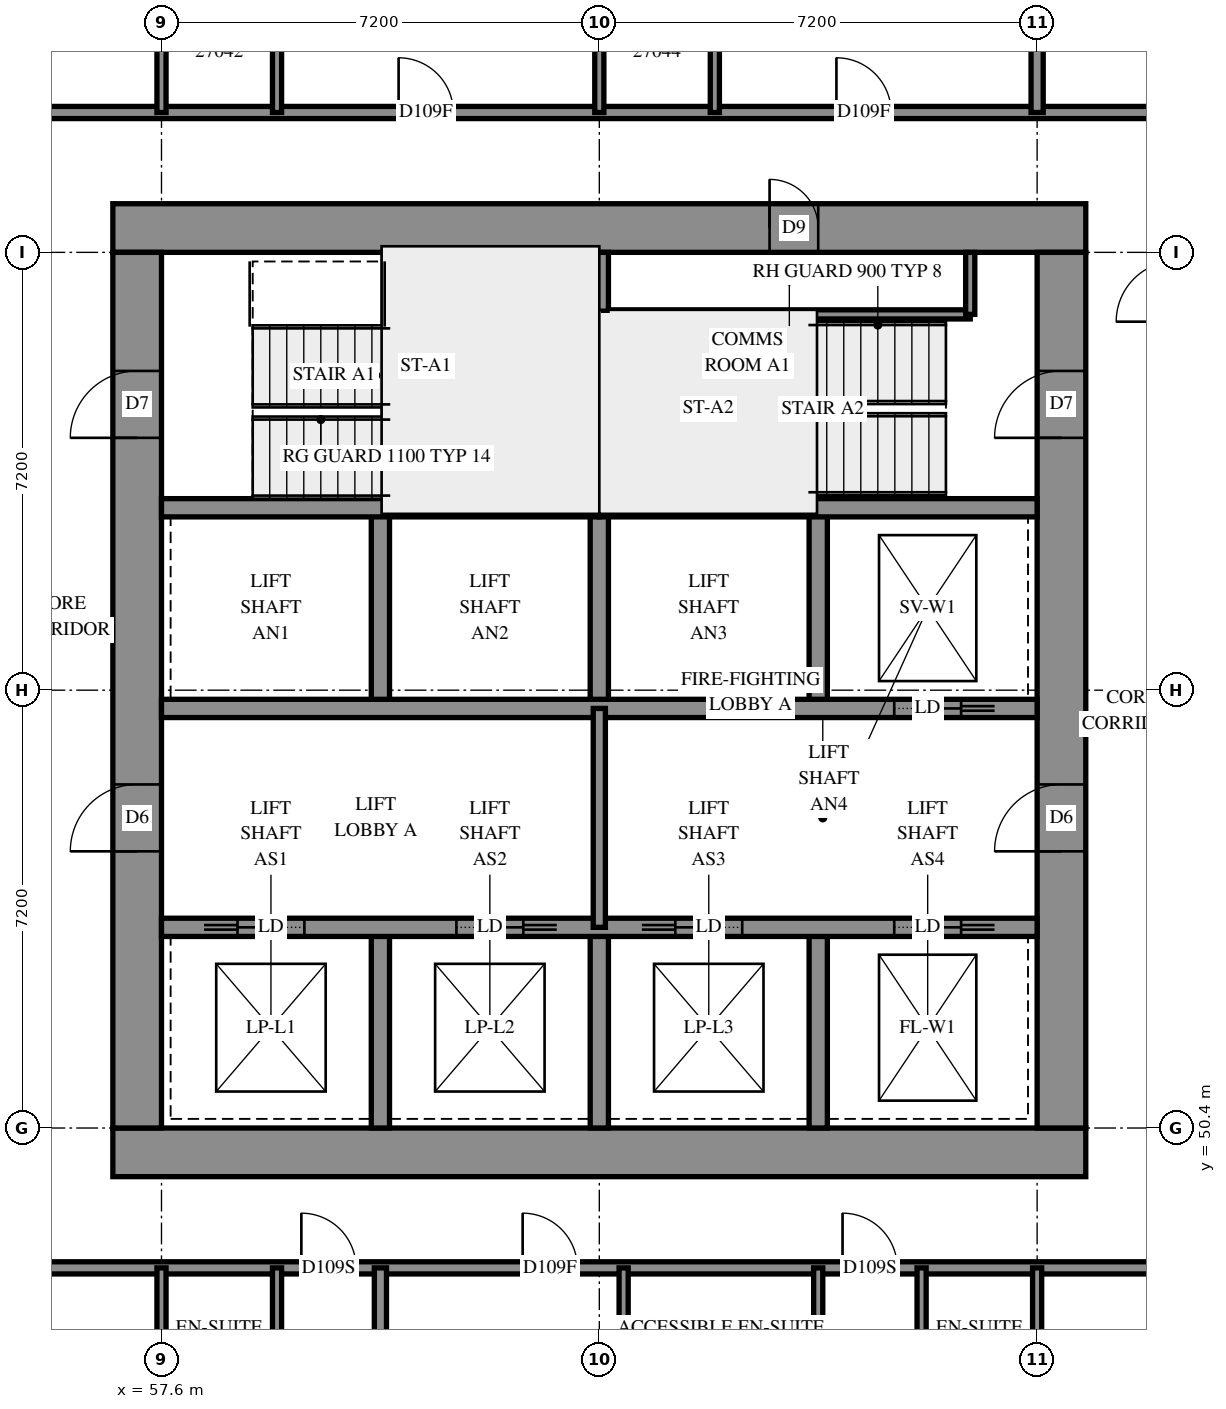
"""IFC4 building model, lengths in metres.
Left out: names, types, materials, properties, quantities, classifications, styles, units other than length and angle.
Written with IfcOpenShell. Run it as: python <this file> out.ifc"""

import sys

from ifc_helpers import new_model, si_unit, direction, frame, frame_2d, origin, place, context, subcontext, project, spatial, rectangle, extrude, element, fill, save


model = new_model("IFC4")
c1 = context("Model", 3, precision=1e-05, world=origin(), true_north=direction((0.0, 1.0)))
c2 = subcontext(c1, "Body", "Model", "MODEL_VIEW")
j1 = project(units=[si_unit("LENGTHUNIT", "METRE"), si_unit("PLANEANGLEUNIT", "RADIAN")], contexts=[c1])
p1 = place(None, origin())
s1 = spatial("IfcSite", under=j1, at=p1, CompositionType="ELEMENT")
p2 = place(p1, origin())
s2 = spatial("IfcBuilding", under=s1, at=p2, CompositionType="ELEMENT")
p3 = place(p2, frame((0.0, 0.0, 101.6)))
s3 = spatial("IfcBuildingStorey", under=s2, at=p3, CompositionType="ELEMENT", Elevation=101.6)
p4 = place(p3, frame((56.8, 50.0, -0.3), z_axis=(0.0, 0.0, 1.0), x_axis=(1.0, 0.0, 0.0)))
e1 = element("IfcWall", 1, at=p4, inside=s3, PredefinedType="SHEAR", context=c2, shape_type="SweptSolid", body=[
    extrude(rectangle(XDim=16.0, YDim=0.8, at=frame_2d((8.0, 0.0))), origin(), (0.0, 0.0, 1.0), 2.7),
])
p5 = place(p3, frame((56.8, 65.2, -0.3), z_axis=(0.0, 0.0, 1.0), x_axis=(1.0, 0.0, 0.0)))
e2 = element("IfcWall", 2, at=p5, inside=s3, PredefinedType="SHEAR", context=c2, shape_type="SweptSolid", body=[
    extrude(rectangle(XDim=16.0, YDim=0.8, at=frame_2d((8.0, 0.0))), origin(), (0.0, 0.0, 1.0), 2.7),
])
p6 = place(p5, frame((10.8, 0.0, 0.3)))
e3 = element("IfcOpeningElement", 3, at=p6, cuts=e2, PredefinedType="OPENING", context=c2, shape_type="SweptSolid", body=[
    extrude(rectangle(XDim=0.8, YDim=2.1, at=frame_2d((0.4, 1.05))), frame((0.0, 0.41, 0.0), z_axis=(0.0, -1.0, 0.0), x_axis=(1.0, 0.0, 0.0)), (0.0, 0.0, 1.0), 0.82),
])
p7 = place(p3, frame((57.2, 50.4, -0.3), z_axis=(0.0, 0.0, 1.0), x_axis=(0.0, 1.0, 0.0)))
e4 = element("IfcWall", 4, at=p7, inside=s3, PredefinedType="SHEAR", context=c2, shape_type="SweptSolid", body=[
    extrude(rectangle(XDim=14.4, YDim=0.8, at=frame_2d((7.2, 0.0))), origin(), (0.0, 0.0, 1.0), 2.7),
])
p8 = place(p7, frame((4.55, 0.0, 0.3)))
e5 = element("IfcOpeningElement", 5, at=p8, cuts=e4, PredefinedType="OPENING", context=c2, shape_type="SweptSolid", body=[
    extrude(rectangle(XDim=1.1, YDim=2.1, at=frame_2d((0.55, 1.05))), frame((0.0, 0.41, 0.0), z_axis=(0.0, -1.0, 0.0), x_axis=(1.0, 0.0, 0.0)), (0.0, 0.0, 1.0), 0.82),
])
p9 = place(p7, frame((11.35, 0.0, 0.3)))
e6 = element("IfcOpeningElement", 6, at=p9, cuts=e4, PredefinedType="OPENING", context=c2, shape_type="SweptSolid", body=[
    extrude(rectangle(XDim=1.1, YDim=2.1, at=frame_2d((0.55, 1.05))), frame((0.0, 0.41, 0.0), z_axis=(0.0, -1.0, 0.0), x_axis=(1.0, 0.0, 0.0)), (0.0, 0.0, 1.0), 0.82),
])
p10 = place(p3, frame((72.4, 50.4, -0.3), z_axis=(0.0, 0.0, 1.0), x_axis=(0.0, 1.0, 0.0)))
e7 = element("IfcWall", 7, at=p10, inside=s3, PredefinedType="SHEAR", context=c2, shape_type="SweptSolid", body=[
    extrude(rectangle(XDim=14.4, YDim=0.8, at=frame_2d((7.2, 0.0))), origin(), (0.0, 0.0, 1.0), 2.7),
])
p11 = place(p10, frame((4.55, 0.0, 0.3)))
e8 = element("IfcOpeningElement", 8, at=p11, cuts=e7, PredefinedType="OPENING", context=c2, shape_type="SweptSolid", body=[
    extrude(rectangle(XDim=1.1, YDim=2.1, at=frame_2d((0.55, 1.05))), frame((0.0, 0.41, 0.0), z_axis=(0.0, -1.0, 0.0), x_axis=(1.0, 0.0, 0.0)), (0.0, 0.0, 1.0), 0.82),
])
p12 = place(p10, frame((11.35, 0.0, 0.3)))
e9 = element("IfcOpeningElement", 9, at=p12, cuts=e7, PredefinedType="OPENING", context=c2, shape_type="SweptSolid", body=[
    extrude(rectangle(XDim=1.1, YDim=2.1, at=frame_2d((0.55, 1.05))), frame((0.0, 0.41, 0.0), z_axis=(0.0, -1.0, 0.0), x_axis=(1.0, 0.0, 0.0)), (0.0, 0.0, 1.0), 0.82),
])
for number, where, z_axis, x_axis in (
    (10, (61.2, 50.4, 0.0), (0.0, 0.0, 1.0), (0.0, 1.0, 0.0)),
    (11, (61.2, 57.3, 0.0), (0.0, 0.0, 1.0), (0.0, 1.0, 0.0)),
    (12, (64.8, 50.4, 0.0), (0.0, 0.0, 1.0), (0.0, 1.0, 0.0)),
    (13, (64.8, 57.3, 0.0), (0.0, 0.0, 1.0), (0.0, 1.0, 0.0)),
    (14, (68.4, 50.4, 0.0), (0.0, 0.0, 1.0), (0.0, 1.0, 0.0)),
    (15, (68.4, 57.3, 0.0), (0.0, 0.0, 1.0), (0.0, 1.0, 0.0)),
):
    element("IfcWall", number, at=place(p3, frame(where, z_axis=z_axis, x_axis=x_axis)), inside=s3, PredefinedType="SOLIDWALL", context=c2, shape_type="SweptSolid", body=[
        extrude(rectangle(XDim=3.3, YDim=0.3, at=frame_2d((1.65, 0.0))), origin(), (0.0, 0.0, 1.0), 3.1),
    ])
p13 = place(p3, frame((57.6, 53.7, 0.0), z_axis=(0.0, 0.0, 1.0), x_axis=(1.0, 0.0, 0.0)))
e16 = element("IfcWall", 16, at=p13, inside=s3, PredefinedType="SOLIDWALL", context=c2, shape_type="SweptSolid", body=[
    extrude(rectangle(XDim=14.4, YDim=0.3, at=frame_2d((7.2, 0.0))), origin(), (0.0, 0.0, 1.0), 3.1),
])
p14 = place(p13, frame((1.25, 0.0, 0.0)))
e17 = element("IfcOpeningElement", 17, at=p14, cuts=e16, PredefinedType="OPENING", context=c2, shape_type="SweptSolid", body=[
    extrude(rectangle(XDim=1.1, YDim=2.1, at=frame_2d((0.55, 1.05))), frame((0.0, 0.16, 0.0), z_axis=(0.0, -1.0, 0.0), x_axis=(1.0, 0.0, 0.0)), (0.0, 0.0, 1.0), 0.32),
])
p15 = place(p13, frame((4.85, 0.0, 0.0)))
e18 = element("IfcOpeningElement", 18, at=p15, cuts=e16, PredefinedType="OPENING", context=c2, shape_type="SweptSolid", body=[
    extrude(rectangle(XDim=1.1, YDim=2.1, at=frame_2d((0.55, 1.05))), frame((0.0, 0.16, 0.0), z_axis=(0.0, -1.0, 0.0), x_axis=(1.0, 0.0, 0.0)), (0.0, 0.0, 1.0), 0.32),
])
p16 = place(p13, frame((8.45, 0.0, 0.0)))
e19 = element("IfcOpeningElement", 19, at=p16, cuts=e16, PredefinedType="OPENING", context=c2, shape_type="SweptSolid", body=[
    extrude(rectangle(XDim=1.1, YDim=2.1, at=frame_2d((0.55, 1.05))), frame((0.0, 0.16, 0.0), z_axis=(0.0, -1.0, 0.0), x_axis=(1.0, 0.0, 0.0)), (0.0, 0.0, 1.0), 0.32),
])
p17 = place(p13, frame((12.05, 0.0, 0.0)))
e20 = element("IfcOpeningElement", 20, at=p17, cuts=e16, PredefinedType="OPENING", context=c2, shape_type="SweptSolid", body=[
    extrude(rectangle(XDim=1.1, YDim=2.1, at=frame_2d((0.55, 1.05))), frame((0.0, 0.16, 0.0), z_axis=(0.0, -1.0, 0.0), x_axis=(1.0, 0.0, 0.0)), (0.0, 0.0, 1.0), 0.32),
])
p18 = place(p3, frame((57.6, 57.3, 0.0), z_axis=(0.0, 0.0, 1.0), x_axis=(1.0, 0.0, 0.0)))
e21 = element("IfcWall", 21, at=p18, inside=s3, PredefinedType="SOLIDWALL", context=c2, shape_type="SweptSolid", body=[
    extrude(rectangle(XDim=14.4, YDim=0.3, at=frame_2d((7.2, 0.0))), origin(), (0.0, 0.0, 1.0), 3.1),
])
p19 = place(p18, frame((12.05, 0.0, 0.0)))
e22 = element("IfcOpeningElement", 22, at=p19, cuts=e21, PredefinedType="OPENING", context=c2, shape_type="SweptSolid", body=[
    extrude(rectangle(XDim=1.1, YDim=2.1, at=frame_2d((0.55, 1.05))), frame((0.0, 0.16, 0.0), z_axis=(0.0, -1.0, 0.0), x_axis=(1.0, 0.0, 0.0)), (0.0, 0.0, 1.0), 0.32),
])
for number, where, z_axis, x_axis in (
    (23, (57.6, 60.6, 0.0), (0.0, 0.0, 1.0), (1.0, 0.0, 0.0)),
    (24, (64.8, 60.6, 0.0), (0.0, 0.0, 1.0), (1.0, 0.0, 0.0)),
):
    element("IfcWall", number, at=place(p3, frame(where, z_axis=z_axis, x_axis=x_axis)), inside=s3, PredefinedType="SOLIDWALL", context=c2, shape_type="SweptSolid", body=[
        extrude(rectangle(XDim=7.2, YDim=0.3, at=frame_2d((3.6, 0.0))), origin(), (0.0, 0.0, 1.0), 3.1),
    ])
p20 = place(p3, frame((64.8, 60.6, 0.0), z_axis=(0.0, 0.0, 1.0), x_axis=(0.0, 1.0, 0.0)))
e25 = element("IfcWall", 25, at=p20, inside=s3, PredefinedType="SOLIDWALL", context=c2, shape_type="SweptSolid", body=[
    extrude(rectangle(XDim=4.2, YDim=0.3, at=frame_2d((2.1, 0.0))), origin(), (0.0, 0.0, 1.0), 3.1),
])
p21 = place(p3, frame((64.95, 63.78, 0.0), z_axis=(0.0, 0.0, 1.0), x_axis=(1.0, 0.0, 0.0)))
e26 = element("IfcWall", 26, at=p21, inside=s3, PredefinedType="PARTITIONING", context=c2, shape_type="SweptSolid", body=[
    extrude(rectangle(XDim=5.95, YDim=0.15, at=frame_2d((2.975, 0.0))), origin(), (0.0, 0.0, 1.0), 3.1),
])
p22 = place(p3, frame((70.9, 63.78, 0.0), z_axis=(0.0, 0.0, 1.0), x_axis=(0.0, 1.0, 0.0)))
e27 = element("IfcWall", 27, at=p22, inside=s3, PredefinedType="PARTITIONING", context=c2, shape_type="SweptSolid", body=[
    extrude(rectangle(XDim=1.02, YDim=0.15, at=frame_2d((0.51, 0.0))), origin(), (0.0, 0.0, 1.0), 3.1),
])
p23 = place(p3, frame((64.8, 53.7, 0.0), z_axis=(0.0, 0.0, 1.0), x_axis=(0.0, 1.0, 0.0)))
e28 = element("IfcWall", 28, at=p23, inside=s3, PredefinedType="PARTITIONING", context=c2, shape_type="SweptSolid", body=[
    extrude(rectangle(XDim=3.6, YDim=0.2, at=frame_2d((1.8, 0.0))), origin(), (0.0, 0.0, 1.0), 3.1),
])
p24 = place(p3, frame((55.3, 48.1, 0.0), z_axis=(0.0, 0.0, 1.0), x_axis=(1.0, 0.0, 0.0)))
e29 = element("IfcWall", 29, at=p24, inside=s3, PredefinedType="PARTITIONING", context=c2, shape_type="SweptSolid", body=[
    extrude(rectangle(XDim=19.092, YDim=0.2, at=frame_2d((9.546, 0.0))), origin(), (0.0, 0.0, 1.0), 3.1),
])
p25 = place(p24, frame((4.6, 0.0, 0.0)))
e30 = element("IfcOpeningElement", 30, at=p25, cuts=e29, PredefinedType="OPENING", context=c2, shape_type="SweptSolid", body=[
    extrude(rectangle(XDim=0.9, YDim=2.1, at=frame_2d((0.45, 1.05))), frame((0.0, 0.11, 0.0), z_axis=(0.0, -1.0, 0.0), x_axis=(1.0, 0.0, 0.0)), (0.0, 0.0, 1.0), 0.22),
])
p26 = place(p24, frame((8.239, 0.0, 0.0)))
e31 = element("IfcOpeningElement", 31, at=p26, cuts=e29, PredefinedType="OPENING", context=c2, shape_type="SweptSolid", body=[
    extrude(rectangle(XDim=0.9, YDim=2.1, at=frame_2d((0.45, 1.05))), frame((0.0, 0.11, 0.0), z_axis=(0.0, -1.0, 0.0), x_axis=(1.0, 0.0, 0.0)), (0.0, 0.0, 1.0), 0.22),
])
p27 = place(p24, frame((13.5, 0.0, 0.0)))
e32 = element("IfcOpeningElement", 32, at=p27, cuts=e29, PredefinedType="OPENING", context=c2, shape_type="SweptSolid", body=[
    extrude(rectangle(XDim=0.9, YDim=2.1, at=frame_2d((0.45, 1.05))), frame((0.0, 0.11, 0.0), z_axis=(0.0, -1.0, 0.0), x_axis=(1.0, 0.0, 0.0)), (0.0, 0.0, 1.0), 0.22),
])
p28 = place(p3, frame((55.3, 67.1, 0.0), z_axis=(0.0, 0.0, 1.0), x_axis=(1.0, 0.0, 0.0)))
e33 = element("IfcWall", 33, at=p28, inside=s3, PredefinedType="PARTITIONING", context=c2, shape_type="SweptSolid", body=[
    extrude(rectangle(XDim=19.0, YDim=0.2, at=frame_2d((9.5, 0.0))), origin(), (0.0, 0.0, 1.0), 3.1),
])
p29 = place(p28, frame((6.199, 0.0, 0.0)))
e34 = element("IfcOpeningElement", 34, at=p29, cuts=e33, PredefinedType="OPENING", context=c2, shape_type="SweptSolid", body=[
    extrude(rectangle(XDim=0.9, YDim=2.1, at=frame_2d((0.45, 1.05))), frame((0.0, 0.11, 0.0), z_axis=(0.0, -1.0, 0.0), x_axis=(1.0, 0.0, 0.0)), (0.0, 0.0, 1.0), 0.22),
])
p30 = place(p28, frame((13.399, 0.0, 0.0)))
e35 = element("IfcOpeningElement", 35, at=p30, cuts=e33, PredefinedType="OPENING", context=c2, shape_type="SweptSolid", body=[
    extrude(rectangle(XDim=0.9, YDim=2.1, at=frame_2d((0.45, 1.05))), frame((0.0, 0.11, 0.0), z_axis=(0.0, -1.0, 0.0), x_axis=(1.0, 0.0, 0.0)), (0.0, 0.0, 1.0), 0.22),
])
p31 = place(p3, frame((61.2, 42.307, 0.0), z_axis=(0.0, 0.0, 1.0), x_axis=(0.0, 1.0, 0.0)))
e36 = element("IfcWall", 36, at=p31, inside=s3, PredefinedType="PARTITIONING", context=c2, shape_type="SweptSolid", body=[
    extrude(rectangle(XDim=5.793, YDim=0.2, at=frame_2d((2.897, 0.0))), origin(), (0.0, 0.0, 1.0), 3.1),
])
p32 = place(p3, frame((72.0, 67.1, 0.0), z_axis=(0.0, 0.0, 1.0), x_axis=(0.0, 1.0, 0.0)))
e37 = element("IfcWall", 37, at=p32, inside=s3, PredefinedType="PARTITIONING", context=c2, shape_type="SweptSolid", body=[
    extrude(rectangle(XDim=4.4, YDim=0.2, at=frame_2d((2.2, 0.0))), origin(), (0.0, 0.0, 1.0), 3.1),
])
for number, where, z_axis, x_axis in (
    (38, (59.5, 67.1, 0.0), (0.0, 0.0, 1.0), (0.0, 1.0, 0.0)),
    (39, (57.6, 67.1, 0.0), (0.0, 0.0, 1.0), (0.0, 1.0, 0.0)),
    (40, (64.8, 67.1, 0.0), (0.0, 0.0, 1.0), (0.0, 1.0, 0.0)),
    (41, (66.7, 67.1, 0.0), (0.0, 0.0, 1.0), (0.0, 1.0, 0.0)),
    (42, (59.5, 45.7, 0.0), (0.0, 0.0, 1.0), (0.0, 1.0, 0.0)),
    (43, (57.6, 45.7, 0.0), (0.0, 0.0, 1.0), (0.0, 1.0, 0.0)),
    (44, (65.2, 45.7, 0.0), (0.0, 0.0, 1.0), (0.0, 1.0, 0.0)),
    (45, (68.4, 45.7, 0.0), (0.0, 0.0, 1.0), (0.0, 1.0, 0.0)),
    (46, (70.1, 45.7, 0.0), (0.0, 0.0, 1.0), (0.0, 1.0, 0.0)),
    (47, (72.0, 45.7, 0.0), (0.0, 0.0, 1.0), (0.0, 1.0, 0.0)),
):
    element("IfcWall", number, at=place(p3, frame(where, z_axis=z_axis, x_axis=x_axis)), inside=s3, PredefinedType="PARTITIONING", context=c2, shape_type="SweptSolid", body=[
        extrude(rectangle(XDim=2.4, YDim=0.15, at=frame_2d((1.2, 0.0))), origin(), (0.0, 0.0, 1.0), 3.1),
    ])
p33 = place(p6, origin())
e48 = element("IfcDoor", 48, at=p33, inside=s3, OperationType="SINGLE_SWING_RIGHT", PredefinedType="DOOR", context=c2, shape_type="SweptSolid", body=[
    extrude(rectangle(XDim=0.8, YDim=2.1, at=frame_2d((0.4, 1.05))), frame((0.0, -0.34, 0.0), z_axis=(0.0, -1.0, 0.0), x_axis=(1.0, 0.0, 0.0)), (0.0, 0.0, 1.0), 0.05),
])
fill(e3, e48)
p34 = place(p8, origin())
e49 = element("IfcDoor", 49, at=p34, inside=s3, OperationType="DOUBLE_DOOR_SINGLE_SWING", PredefinedType="DOOR", context=c2, shape_type="SweptSolid", body=[
    extrude(rectangle(XDim=1.1, YDim=2.1, at=frame_2d((0.55, 1.05))), frame((0.0, 0.025, 0.0), z_axis=(0.0, -1.0, 0.0), x_axis=(1.0, 0.0, 0.0)), (0.0, 0.0, 1.0), 0.05),
])
fill(e5, e49)
p35 = place(p11, origin())
e50 = element("IfcDoor", 50, at=p35, inside=s3, OperationType="DOUBLE_DOOR_SINGLE_SWING", PredefinedType="DOOR", context=c2, shape_type="SweptSolid", body=[
    extrude(rectangle(XDim=1.1, YDim=2.1, at=frame_2d((0.55, 1.05))), frame((0.0, 0.025, 0.0), z_axis=(0.0, -1.0, 0.0), x_axis=(1.0, 0.0, 0.0)), (0.0, 0.0, 1.0), 0.05),
])
fill(e8, e50)
p36 = place(p9, origin())
e51 = element("IfcDoor", 51, at=p36, inside=s3, OperationType="SINGLE_SWING_LEFT", PredefinedType="DOOR", context=c2, shape_type="SweptSolid", body=[
    extrude(rectangle(XDim=1.1, YDim=2.1, at=frame_2d((0.55, 1.05))), frame((0.0, 0.025, 0.0), z_axis=(0.0, -1.0, 0.0), x_axis=(1.0, 0.0, 0.0)), (0.0, 0.0, 1.0), 0.05),
])
fill(e6, e51)
p37 = place(p12, origin())
e52 = element("IfcDoor", 52, at=p37, inside=s3, OperationType="SINGLE_SWING_RIGHT", PredefinedType="DOOR", context=c2, shape_type="SweptSolid", body=[
    extrude(rectangle(XDim=1.1, YDim=2.1, at=frame_2d((0.55, 1.05))), frame((0.0, 0.025, 0.0), z_axis=(0.0, -1.0, 0.0), x_axis=(1.0, 0.0, 0.0)), (0.0, 0.0, 1.0), 0.05),
])
fill(e9, e52)
p38 = place(p14, origin())
e53 = element("IfcDoor", 53, at=p38, inside=s3, OperationType="SLIDING_TO_LEFT", PredefinedType="DOOR", context=c2, shape_type="SweptSolid", body=[
    extrude(rectangle(XDim=1.1, YDim=2.1, at=frame_2d((0.55, 1.05))), frame((0.0, 0.025, 0.0), z_axis=(0.0, -1.0, 0.0), x_axis=(1.0, 0.0, 0.0)), (0.0, 0.0, 1.0), 0.05),
])
fill(e17, e53)
p39 = place(p15, origin())
e54 = element("IfcDoor", 54, at=p39, inside=s3, OperationType="SLIDING_TO_RIGHT", PredefinedType="DOOR", context=c2, shape_type="SweptSolid", body=[
    extrude(rectangle(XDim=1.1, YDim=2.1, at=frame_2d((0.55, 1.05))), frame((0.0, 0.025, 0.0), z_axis=(0.0, -1.0, 0.0), x_axis=(1.0, 0.0, 0.0)), (0.0, 0.0, 1.0), 0.05),
])
fill(e18, e54)
p40 = place(p16, origin())
e55 = element("IfcDoor", 55, at=p40, inside=s3, OperationType="SLIDING_TO_LEFT", PredefinedType="DOOR", context=c2, shape_type="SweptSolid", body=[
    extrude(rectangle(XDim=1.1, YDim=2.1, at=frame_2d((0.55, 1.05))), frame((0.0, 0.025, 0.0), z_axis=(0.0, -1.0, 0.0), x_axis=(1.0, 0.0, 0.0)), (0.0, 0.0, 1.0), 0.05),
])
fill(e19, e55)
p41 = place(p17, origin())
e56 = element("IfcDoor", 56, at=p41, inside=s3, OperationType="SLIDING_TO_RIGHT", PredefinedType="DOOR", context=c2, shape_type="SweptSolid", body=[
    extrude(rectangle(XDim=1.1, YDim=2.1, at=frame_2d((0.55, 1.05))), frame((0.0, 0.025, 0.0), z_axis=(0.0, -1.0, 0.0), x_axis=(1.0, 0.0, 0.0)), (0.0, 0.0, 1.0), 0.05),
])
fill(e20, e56)
p42 = place(p19, origin())
e57 = element("IfcDoor", 57, at=p42, inside=s3, OperationType="SLIDING_TO_RIGHT", PredefinedType="DOOR", context=c2, shape_type="SweptSolid", body=[
    extrude(rectangle(XDim=1.1, YDim=2.1, at=frame_2d((0.55, 1.05))), frame((0.0, 0.025, 0.0), z_axis=(0.0, -1.0, 0.0), x_axis=(1.0, 0.0, 0.0)), (0.0, 0.0, 1.0), 0.05),
])
fill(e22, e57)
p43 = place(p29, origin())
e58 = element("IfcDoor", 58, at=p43, inside=s3, OperationType="SINGLE_SWING_RIGHT", PredefinedType="DOOR", context=c2, shape_type="SweptSolid", body=[
    extrude(rectangle(XDim=0.9, YDim=2.1, at=frame_2d((0.45, 1.05))), frame((0.0, 0.025, 0.0), z_axis=(0.0, -1.0, 0.0), x_axis=(1.0, 0.0, 0.0)), (0.0, 0.0, 1.0), 0.05),
])
fill(e34, e58)
p44 = place(p30, origin())
e59 = element("IfcDoor", 59, at=p44, inside=s3, OperationType="SINGLE_SWING_RIGHT", PredefinedType="DOOR", context=c2, shape_type="SweptSolid", body=[
    extrude(rectangle(XDim=0.9, YDim=2.1, at=frame_2d((0.45, 1.05))), frame((0.0, 0.025, 0.0), z_axis=(0.0, -1.0, 0.0), x_axis=(1.0, 0.0, 0.0)), (0.0, 0.0, 1.0), 0.05),
])
fill(e35, e59)
p45 = place(p25, origin())
e60 = element("IfcDoor", 60, at=p45, inside=s3, OperationType="SINGLE_SWING_LEFT", PredefinedType="DOOR", context=c2, shape_type="SweptSolid", body=[
    extrude(rectangle(XDim=0.9, YDim=2.1, at=frame_2d((0.45, 1.05))), frame((0.0, 0.025, 0.0), z_axis=(0.0, -1.0, 0.0), x_axis=(1.0, 0.0, 0.0)), (0.0, 0.0, 1.0), 0.05),
])
fill(e30, e60)
p46 = place(p26, origin())
e61 = element("IfcDoor", 61, at=p46, inside=s3, OperationType="SINGLE_SWING_RIGHT", PredefinedType="DOOR", context=c2, shape_type="SweptSolid", body=[
    extrude(rectangle(XDim=0.9, YDim=2.1, at=frame_2d((0.45, 1.05))), frame((0.0, 0.025, 0.0), z_axis=(0.0, -1.0, 0.0), x_axis=(1.0, 0.0, 0.0)), (0.0, 0.0, 1.0), 0.05),
])
fill(e31, e61)
p47 = place(p27, origin())
e62 = element("IfcDoor", 62, at=p47, inside=s3, OperationType="SINGLE_SWING_RIGHT", PredefinedType="DOOR", context=c2, shape_type="SweptSolid", body=[
    extrude(rectangle(XDim=0.9, YDim=2.1, at=frame_2d((0.45, 1.05))), frame((0.0, 0.025, 0.0), z_axis=(0.0, -1.0, 0.0), x_axis=(1.0, 0.0, 0.0)), (0.0, 0.0, 1.0), 0.05),
])
fill(e32, e62)
save(model, sys.argv[1])
